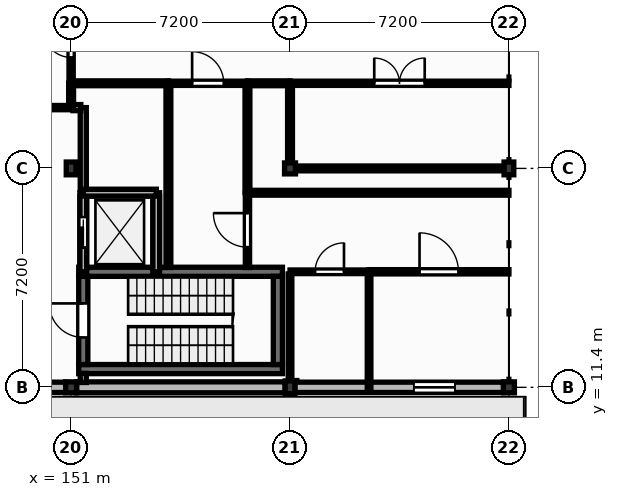
"""IFC4 building model, lengths in metres.
Left out: names, types, materials, properties, quantities, classifications, styles, units other than length and angle.
Written with IfcOpenShell. Run it as: python <this file> out.ifc"""

import sys

from ifc_helpers import new_model, si_unit, direction, frame, frame_2d, origin, origin_2d, place, context, subcontext, project, spatial, rectangle, extrude, element, fill, save


model = new_model("IFC4")
c1 = context("Model", 3, precision=1e-05, world=origin(), true_north=direction((0.0, 1.0)))
c2 = subcontext(c1, "Body", "Model", "MODEL_VIEW")
j1 = project(units=[si_unit("LENGTHUNIT", "METRE"), si_unit("PLANEANGLEUNIT", "RADIAN")], contexts=[c1])
p1 = place(None, origin())
s1 = spatial("IfcSite", under=j1, at=p1, CompositionType="ELEMENT")
p2 = place(p1, origin())
s2 = spatial("IfcBuilding", under=s1, at=p2, CompositionType="ELEMENT")
p3 = place(p2, frame((0.0, 0.0, 4.5)))
s3 = spatial("IfcBuildingStorey", under=s2, at=p3, CompositionType="ELEMENT", Elevation=4.5)
p4 = place(p3, frame((151.0, 11.4, 0.0), z_axis=(0.0, 0.0, 1.0), x_axis=(1.0, 0.0, 0.0)))
e1 = element("IfcColumn", 1, at=p4, inside=s3, PredefinedType="COLUMN", context=c2, shape_type="SweptSolid", body=[
    extrude(rectangle(XDim=0.36, YDim=0.36, at=origin_2d()), origin(), (0.0, 0.0, 1.0), 4.26),
])
for number, where, z_axis, x_axis in (
    (2, (151.0, 18.6, 0.0), (0.0, 0.0, 1.0), (1.0, 0.0, 0.0)),
    (3, (158.2, 11.4, 0.0), (0.0, 0.0, 1.0), (1.0, 0.0, 0.0)),
):
    element("IfcColumn", number, at=place(p3, frame(where, z_axis=z_axis, x_axis=x_axis)), inside=s3, PredefinedType="COLUMN", context=c2, shape_type="SweptSolid", body=[
        extrude(rectangle(XDim=0.32, YDim=0.42, at=origin_2d()), origin(), (0.0, 0.0, 1.0), 4.26),
    ])
for number, where, z_axis, x_axis in (
    (4, (158.2, 18.6, 0.0), (0.0, 0.0, 1.0), (1.0, 0.0, 0.0)),
    (5, (165.4, 11.4, 0.0), (0.0, 0.0, 1.0), (1.0, 0.0, 0.0)),
):
    element("IfcColumn", number, at=place(p3, frame(where, z_axis=z_axis, x_axis=x_axis)), inside=s3, PredefinedType="COLUMN", context=c2, shape_type="SweptSolid", body=[
        extrude(rectangle(XDim=0.36, YDim=0.36, at=origin_2d()), origin(), (0.0, 0.0, 1.0), 4.26),
    ])
p5 = place(p3, frame((165.4, 18.6, 0.0), z_axis=(0.0, 0.0, 1.0), x_axis=(1.0, 0.0, 0.0)))
e6 = element("IfcColumn", 6, at=p5, inside=s3, PredefinedType="COLUMN", context=c2, shape_type="SweptSolid", body=[
    extrude(rectangle(XDim=0.32, YDim=0.42, at=origin_2d()), origin(), (0.0, 0.0, 1.0), 4.26),
])
p6 = place(p3, frame((144.05, 11.4, 0.0), z_axis=(0.0, 0.0, 1.0), x_axis=(1.0, 0.0, 0.0)))
e7 = element("IfcWall", 7, at=p6, inside=s3, PredefinedType="SOLIDWALL", context=c2, shape_type="SweptSolid", body=[
    extrude(rectangle(XDim=6.77, YDim=0.34, at=frame_2d((3.385, 0.0))), origin(), (0.0, 0.0, 1.0), 3.76),
])
p7 = place(p6, frame((1.75, 0.0, 0.0)))
e8 = element("IfcOpeningElement", 8, at=p7, cuts=e7, PredefinedType="OPENING", context=c2, shape_type="SweptSolid", body=[
    extrude(rectangle(XDim=1.18, YDim=2.2, at=frame_2d((0.59, 1.1))), frame((0.0, 0.18, 0.0), z_axis=(0.0, -1.0, 0.0), x_axis=(1.0, 0.0, 0.0)), (0.0, 0.0, 1.0), 0.36),
])
p8 = place(p6, frame((4.4, 0.0, 1.05)))
e9 = element("IfcOpeningElement", 9, at=p8, cuts=e7, PredefinedType="OPENING", context=c2, shape_type="SweptSolid", body=[
    extrude(rectangle(XDim=1.4, YDim=1.65, at=frame_2d((0.7, 0.825))), frame((0.0, 0.18, 0.0), z_axis=(0.0, -1.0, 0.0), x_axis=(1.0, 0.0, 0.0)), (0.0, 0.0, 1.0), 0.36),
])
p9 = place(p3, frame((151.18, 11.4, 0.0), z_axis=(0.0, 0.0, 1.0), x_axis=(1.0, 0.0, 0.0)))
e10 = element("IfcWall", 10, at=p9, inside=s3, PredefinedType="SOLIDWALL", context=c2, shape_type="SweptSolid", body=[
    extrude(rectangle(XDim=6.86, YDim=0.36, at=frame_2d((3.43, 0.0))), origin(), (0.0, 0.0, 1.0), 3.8),
])
p10 = place(p3, frame((158.36, 11.4, 0.0), z_axis=(0.0, 0.0, 1.0), x_axis=(1.0, 0.0, 0.0)))
e11 = element("IfcWall", 11, at=p10, inside=s3, PredefinedType="SOLIDWALL", context=c2, shape_type="SweptSolid", body=[
    extrude(rectangle(XDim=6.86, YDim=0.34, at=frame_2d((3.43, 0.0))), origin(), (0.0, 0.0, 1.0), 3.8),
])
p11 = place(p10, frame((3.915, 0.0, 1.0)))
e12 = element("IfcOpeningElement", 12, at=p11, cuts=e11, PredefinedType="OPENING", context=c2, shape_type="SweptSolid", body=[
    extrude(rectangle(XDim=1.35, YDim=2.2, at=frame_2d((0.675, 1.1))), frame((0.0, 0.18, 0.0), z_axis=(0.0, -1.0, 0.0), x_axis=(1.0, 0.0, 0.0)), (0.0, 0.0, 1.0), 0.36),
])
for number, where, z_axis, x_axis in (
    (13, (151.25, 12.0, 0.0), (0.0, 0.0, 1.0), (1.0, 0.0, 0.0)),
    (14, (151.25, 15.2, 0.0), (0.0, 0.0, 1.0), (1.0, 0.0, 0.0)),
):
    element("IfcWall", number, at=place(p3, frame(where, z_axis=z_axis, x_axis=x_axis)), inside=s3, PredefinedType="SHEAR", context=c2, shape_type="SweptSolid", body=[
        extrude(rectangle(XDim=6.7, YDim=0.3, at=frame_2d((3.35, 0.0))), origin(), (0.0, 0.0, 1.0), 4.25),
    ])
p12 = place(p3, frame((151.4, 12.15, 0.0), z_axis=(0.0, 0.0, 1.0), x_axis=(0.0, 1.0, 0.0)))
e15 = element("IfcWall", 15, at=p12, inside=s3, PredefinedType="SHEAR", context=c2, shape_type="SweptSolid", body=[
    extrude(rectangle(XDim=2.9, YDim=0.3, at=frame_2d((1.45, 0.0))), origin(), (0.0, 0.0, 1.0), 4.25),
])
p13 = place(p12, frame((0.89, 0.0, 0.0)))
e16 = element("IfcOpeningElement", 16, at=p13, cuts=e15, PredefinedType="OPENING", context=c2, shape_type="SweptSolid", body=[
    extrude(rectangle(XDim=1.12, YDim=2.1, at=frame_2d((0.56, 1.05))), frame((0.0, 0.16, 0.0), z_axis=(0.0, -1.0, 0.0), x_axis=(1.0, 0.0, 0.0)), (0.0, 0.0, 1.0), 0.32),
])
p14 = place(p3, frame((157.8, 12.15, 0.0), z_axis=(0.0, 0.0, 1.0), x_axis=(0.0, 1.0, 0.0)))
e17 = element("IfcWall", 17, at=p14, inside=s3, PredefinedType="SHEAR", context=c2, shape_type="SweptSolid", body=[
    extrude(rectangle(XDim=2.9, YDim=0.3, at=frame_2d((1.45, 0.0))), origin(), (0.0, 0.0, 1.0), 4.25),
])
p15 = place(p3, frame((151.4, 17.8, 0.0), z_axis=(0.0, 0.0, 1.0), x_axis=(1.0, 0.0, 0.0)))
e18 = element("IfcWall", 18, at=p15, inside=s3, PredefinedType="SOLIDWALL", context=c2, shape_type="SweptSolid", body=[
    extrude(rectangle(XDim=2.4, YDim=0.22, at=frame_2d((1.2, 0.0))), origin(), (0.0, 0.0, 1.0), 4.25),
])
p16 = place(p3, frame((151.4, 15.31, 0.0), z_axis=(0.0, 0.0, 1.0), x_axis=(0.0, 1.0, 0.0)))
e19 = element("IfcWall", 19, at=p16, inside=s3, PredefinedType="SOLIDWALL", context=c2, shape_type="SweptSolid", body=[
    extrude(rectangle(XDim=2.38, YDim=0.22, at=frame_2d((1.19, 0.0))), origin(), (0.0, 0.0, 1.0), 4.25),
])
p17 = place(p16, frame((0.69, 0.0, 0.0)))
e20 = element("IfcOpeningElement", 20, at=p17, cuts=e19, PredefinedType="OPENING", context=c2, shape_type="SweptSolid", body=[
    extrude(rectangle(XDim=1.0, YDim=2.15, at=frame_2d((0.5, 1.075))), frame((0.0, 0.12, 0.0), z_axis=(0.0, -1.0, 0.0), x_axis=(1.0, 0.0, 0.0)), (0.0, 0.0, 1.0), 0.24),
])
p18 = place(p3, frame((153.8, 15.31, 0.0), z_axis=(0.0, 0.0, 1.0), x_axis=(0.0, 1.0, 0.0)))
e21 = element("IfcWall", 21, at=p18, inside=s3, PredefinedType="SOLIDWALL", context=c2, shape_type="SweptSolid", body=[
    extrude(rectangle(XDim=2.38, YDim=0.22, at=frame_2d((1.19, 0.0))), origin(), (0.0, 0.0, 1.0), 4.25),
])
for number, where, z_axis, x_axis in (
    (22, (151.4, 15.2, -0.9), (0.0, 0.0, 1.0), (0.0, 1.0, 0.0)),
    (23, (153.8, 15.2, -0.9), (0.0, 0.0, 1.0), (0.0, 1.0, 0.0)),
):
    element("IfcWall", number, at=place(p3, frame(where, z_axis=z_axis, x_axis=x_axis)), inside=s3, PredefinedType="SOLIDWALL", context=c2, shape_type="SweptSolid", body=[
        extrude(rectangle(XDim=2.6, YDim=0.22, at=frame_2d((1.3, 0.0))), origin(), (0.0, 0.0, 1.0), 0.9),
    ])
p19 = place(p3, frame((151.4, 17.8, -0.9), z_axis=(0.0, 0.0, 1.0), x_axis=(1.0, 0.0, 0.0)))
e24 = element("IfcWall", 24, at=p19, inside=s3, PredefinedType="SOLIDWALL", context=c2, shape_type="SweptSolid", body=[
    extrude(rectangle(XDim=2.4, YDim=0.22, at=frame_2d((1.2, 0.0))), origin(), (0.0, 0.0, 1.0), 0.9),
])
p20 = place(p3, frame((147.6, 20.6, 0.0), z_axis=(0.0, 0.0, 1.0), x_axis=(1.0, 0.0, 0.0)))
e25 = element("IfcWall", 25, at=p20, inside=s3, PredefinedType="PARTITIONING", context=c2, shape_type="SweptSolid", body=[
    extrude(rectangle(XDim=3.4, YDim=0.14, at=frame_2d((1.7, 0.0))), origin(), (0.0, 0.0, 1.0), 4.18),
])
p21 = place(p20, frame((0.8, 0.0, 0.0)))
e26 = element("IfcOpeningElement", 26, at=p21, cuts=e25, PredefinedType="OPENING", context=c2, shape_type="SweptSolid", body=[
    extrude(rectangle(XDim=1.8, YDim=2.3, at=frame_2d((0.9, 1.15))), frame((0.0, 0.08, 0.0), z_axis=(0.0, -1.0, 0.0), x_axis=(1.0, 0.0, 0.0)), (0.0, 0.0, 1.0), 0.16),
])
p22 = place(p3, frame((151.0, 21.4, 0.0), z_axis=(0.0, 0.0, 1.0), x_axis=(0.0, 1.0, 0.0)))
e27 = element("IfcWall", 27, at=p22, inside=s3, PredefinedType="PARTITIONING", context=c2, shape_type="SweptSolid", body=[
    extrude(rectangle(XDim=2.6, YDim=0.14, at=frame_2d((1.3, 0.0))), origin(), (0.0, 0.0, 1.0), 3.62),
])
p23 = place(p22, frame((0.85, 0.0, 0.0)))
e28 = element("IfcOpeningElement", 28, at=p23, cuts=e27, PredefinedType="OPENING", context=c2, shape_type="SweptSolid", body=[
    extrude(rectangle(XDim=0.9, YDim=2.1, at=frame_2d((0.45, 1.05))), frame((0.0, 0.08, 0.0), z_axis=(0.0, -1.0, 0.0), x_axis=(1.0, 0.0, 0.0)), (0.0, 0.0, 1.0), 0.16),
])
p24 = place(p3, frame((154.2, 21.4, 0.0), z_axis=(0.0, 0.0, 1.0), x_axis=(1.0, 0.0, 0.0)))
e29 = element("IfcWall", 29, at=p24, inside=s3, PredefinedType="PARTITIONING", context=c2, shape_type="SweptSolid", body=[
    extrude(rectangle(XDim=2.6, YDim=0.14, at=frame_2d((1.3, 0.0))), origin(), (0.0, 0.0, 1.0), 4.18),
])
p25 = place(p24, frame((0.78, 0.0, 0.0)))
e30 = element("IfcOpeningElement", 30, at=p25, cuts=e29, PredefinedType="OPENING", context=c2, shape_type="SweptSolid", body=[
    extrude(rectangle(XDim=1.04, YDim=2.1, at=frame_2d((0.52, 1.05))), frame((0.0, 0.08, 0.0), z_axis=(0.0, -1.0, 0.0), x_axis=(1.0, 0.0, 0.0)), (0.0, 0.0, 1.0), 0.16),
])
p26 = place(p3, frame((156.8, 15.34, 0.0), z_axis=(0.0, 0.0, 1.0), x_axis=(0.0, 1.0, 0.0)))
e31 = element("IfcWall", 31, at=p26, inside=s3, PredefinedType="PARTITIONING", context=c2, shape_type="SweptSolid", body=[
    extrude(rectangle(XDim=2.46, YDim=0.14, at=frame_2d((1.23, 0.0))), origin(), (0.0, 0.0, 1.0), 4.18),
])
p27 = place(p26, frame((0.67, 0.0, 0.0)))
e32 = element("IfcOpeningElement", 32, at=p27, cuts=e31, PredefinedType="OPENING", context=c2, shape_type="SweptSolid", body=[
    extrude(rectangle(XDim=1.12, YDim=2.15, at=frame_2d((0.56, 1.075))), frame((0.0, 0.08, 0.0), z_axis=(0.0, -1.0, 0.0), x_axis=(1.0, 0.0, 0.0)), (0.0, 0.0, 1.0), 0.16),
])
p28 = place(p3, frame((158.2, 15.2, 0.0), z_axis=(0.0, 0.0, 1.0), x_axis=(1.0, 0.0, 0.0)))
e33 = element("IfcWall", 33, at=p28, inside=s3, PredefinedType="PLUMBINGWALL", context=c2, shape_type="SweptSolid", body=[
    extrude(rectangle(XDim=2.6, YDim=0.12, at=frame_2d((1.3, 0.0))), origin(), (0.0, 0.0, 1.0), 4.18),
])
p29 = place(p28, frame((0.825, 0.0, 0.0)))
e34 = element("IfcOpeningElement", 34, at=p29, cuts=e33, PredefinedType="OPENING", context=c2, shape_type="SweptSolid", body=[
    extrude(rectangle(XDim=0.95, YDim=2.1, at=frame_2d((0.475, 1.05))), frame((0.0, 0.07, 0.0), z_axis=(0.0, -1.0, 0.0), x_axis=(1.0, 0.0, 0.0)), (0.0, 0.0, 1.0), 0.14),
])
p30 = place(p3, frame((158.2, 21.4, 0.0), z_axis=(0.0, 0.0, 1.0), x_axis=(1.0, 0.0, 0.0)))
e35 = element("IfcWall", 35, at=p30, inside=s3, PredefinedType="PARTITIONING", context=c2, shape_type="SweptSolid", body=[
    extrude(rectangle(XDim=7.2, YDim=0.14, at=frame_2d((3.6, 0.0))), origin(), (0.0, 0.0, 1.0), 4.18),
])
p31 = place(p30, frame((2.77, 0.0, 0.0)))
e36 = element("IfcOpeningElement", 36, at=p31, cuts=e35, PredefinedType="OPENING", context=c2, shape_type="SweptSolid", body=[
    extrude(rectangle(XDim=1.66, YDim=2.3, at=frame_2d((0.83, 1.15))), frame((0.0, 0.08, 0.0), z_axis=(0.0, -1.0, 0.0), x_axis=(1.0, 0.0, 0.0)), (0.0, 0.0, 1.0), 0.16),
])
p32 = place(p3, frame((160.8, 11.4, 0.0), z_axis=(0.0, 0.0, 1.0), x_axis=(0.0, 1.0, 0.0)))
e37 = element("IfcWall", 37, at=p32, inside=s3, PredefinedType="PLUMBINGWALL", context=c2, shape_type="SweptSolid", body=[
    extrude(rectangle(XDim=3.73, YDim=0.12, at=frame_2d((1.865, 0.0))), origin(), (0.0, 0.0, 1.0), 4.18),
])
p33 = place(p3, frame((160.8, 15.2, 0.0), z_axis=(0.0, 0.0, 1.0), x_axis=(1.0, 0.0, 0.0)))
e38 = element("IfcWall", 38, at=p33, inside=s3, PredefinedType="PARTITIONING", context=c2, shape_type="SweptSolid", body=[
    extrude(rectangle(XDim=4.6, YDim=0.14, at=frame_2d((2.3, 0.0))), origin(), (0.0, 0.0, 1.0), 4.18),
])
p34 = place(p33, frame((1.66, 0.0, 0.0)))
e39 = element("IfcOpeningElement", 39, at=p34, cuts=e38, PredefinedType="OPENING", context=c2, shape_type="SweptSolid", body=[
    extrude(rectangle(XDim=1.28, YDim=2.2, at=frame_2d((0.64, 1.1))), frame((0.0, 0.08, 0.0), z_axis=(0.0, -1.0, 0.0), x_axis=(1.0, 0.0, 0.0)), (0.0, 0.0, 1.0), 0.16),
])
p35 = place(p3, frame((151.4, 11.56, 0.0), z_axis=(0.0, 0.0, 1.0), x_axis=(0.0, 1.0, 0.0)))
e40 = element("IfcWall", 40, at=p35, inside=s3, PredefinedType="PARTITIONING", context=c2, shape_type="SweptSolid", body=[
    extrude(rectangle(XDim=0.3, YDim=0.2, at=frame_2d((0.15, 0.0))), origin(), (0.0, 0.0, 1.0), 4.18),
])
p36 = place(p3, frame((151.4, 17.91, 0.0), z_axis=(0.0, 0.0, 1.0), x_axis=(0.0, 1.0, 0.0)))
e41 = element("IfcWall", 41, at=p36, inside=s3, PredefinedType="PARTITIONING", context=c2, shape_type="SweptSolid", body=[
    extrude(rectangle(XDim=2.69, YDim=0.2, at=frame_2d((1.345, 0.0))), origin(), (0.0, 0.0, 1.0), 4.18),
])
p37 = place(p3, frame((151.32, 20.6, 0.0), z_axis=(0.0, 0.0, 1.0), x_axis=(-1.0, 0.0, 0.0)))
e42 = element("IfcWall", 42, at=p37, inside=s3, PredefinedType="PARTITIONING", context=c2, shape_type="SweptSolid", body=[
    extrude(rectangle(XDim=0.26, YDim=0.2, at=frame_2d((0.13, 0.0))), origin(), (0.0, 0.0, 1.0), 4.18),
])
p38 = place(p3, frame((151.0, 20.67, 0.0), z_axis=(0.0, 0.0, 1.0), x_axis=(0.0, 1.0, 0.0)))
e43 = element("IfcWall", 43, at=p38, inside=s3, PredefinedType="PARTITIONING", context=c2, shape_type="SweptSolid", body=[
    extrude(rectangle(XDim=0.73, YDim=0.16, at=frame_2d((0.365, 0.0))), origin(), (0.0, 0.0, 1.0), 3.62),
])
p39 = place(p3, frame((151.0, 21.4, 0.0), z_axis=(0.0, 0.0, 1.0), x_axis=(1.0, 0.0, 0.0)))
e44 = element("IfcWall", 44, at=p39, inside=s3, PredefinedType="PARTITIONING", context=c2, shape_type="SweptSolid", body=[
    extrude(rectangle(XDim=3.2, YDim=0.16, at=frame_2d((1.6, 0.0))), origin(), (0.0, 0.0, 1.0), 4.18),
])
p40 = place(p3, frame((156.8, 21.4, 0.0), z_axis=(0.0, 0.0, 1.0), x_axis=(1.0, 0.0, 0.0)))
e45 = element("IfcWall", 45, at=p40, inside=s3, PredefinedType="PARTITIONING", context=c2, shape_type="SweptSolid", body=[
    extrude(rectangle(XDim=1.4, YDim=0.16, at=frame_2d((0.7, 0.0))), origin(), (0.0, 0.0, 1.0), 4.18),
])
p41 = place(p3, frame((156.8, 17.8, 0.0), z_axis=(0.0, 0.0, 1.0), x_axis=(0.0, 1.0, 0.0)))
e46 = element("IfcWall", 46, at=p41, inside=s3, PredefinedType="PARTITIONING", context=c2, shape_type="SweptSolid", body=[
    extrude(rectangle(XDim=3.53, YDim=0.16, at=frame_2d((1.765, 0.0))), origin(), (0.0, 0.0, 1.0), 4.18),
])
p42 = place(p3, frame((154.2, 15.34, 0.0), z_axis=(0.0, 0.0, 1.0), x_axis=(0.0, 1.0, 0.0)))
e47 = element("IfcWall", 47, at=p42, inside=s3, PredefinedType="PARTITIONING", context=c2, shape_type="SweptSolid", body=[
    extrude(rectangle(XDim=5.99, YDim=0.16, at=frame_2d((2.995, 0.0))), origin(), (0.0, 0.0, 1.0), 4.18),
])
p43 = place(p3, frame((165.4, 17.8, 0.0), z_axis=(0.0, 0.0, 1.0), x_axis=(-1.0, 0.0, 0.0)))
e48 = element("IfcWall", 48, at=p43, inside=s3, PredefinedType="PARTITIONING", context=c2, shape_type="SweptSolid", body=[
    extrude(rectangle(XDim=8.6, YDim=0.16, at=frame_2d((4.3, 0.0))), origin(), (0.0, 0.0, 1.0), 4.18),
])
p44 = place(p3, frame((158.2, 11.61, 0.0), z_axis=(0.0, 0.0, 1.0), x_axis=(0.0, 1.0, 0.0)))
e49 = element("IfcWall", 49, at=p44, inside=s3, PredefinedType="PLUMBINGWALL", context=c2, shape_type="SweptSolid", body=[
    extrude(rectangle(XDim=3.52, YDim=0.12, at=frame_2d((1.76, 0.0))), origin(), (0.0, 0.0, 1.0), 3.74),
])
p45 = place(p3, frame((158.38, 18.6, 0.0), z_axis=(0.0, 0.0, 1.0), x_axis=(1.0, 0.0, 0.0)))
e50 = element("IfcWall", 50, at=p45, inside=s3, PredefinedType="PARTITIONING", context=c2, shape_type="SweptSolid", body=[
    extrude(rectangle(XDim=6.86, YDim=0.16, at=frame_2d((3.43, 0.0))), origin(), (0.0, 0.0, 1.0), 3.62),
])
p46 = place(p3, frame((158.2, 18.78, 0.0), z_axis=(0.0, 0.0, 1.0), x_axis=(0.0, 1.0, 0.0)))
e51 = element("IfcWall", 51, at=p46, inside=s3, PredefinedType="PARTITIONING", context=c2, shape_type="SweptSolid", body=[
    extrude(rectangle(XDim=2.55, YDim=0.16, at=frame_2d((1.275, 0.0))), origin(), (0.0, 0.0, 1.0), 3.62),
])
p47 = place(p11, origin())
e52 = element("IfcWindow", 52, at=p47, inside=s3, PartitioningType="SINGLE_PANEL", PredefinedType="WINDOW", context=c2, shape_type="SweptSolid", body=[
    extrude(rectangle(XDim=1.35, YDim=2.2, at=frame_2d((0.675, 1.1))), frame((0.0, 0.03, 0.0), z_axis=(0.0, -1.0, 0.0), x_axis=(1.0, 0.0, 0.0)), (0.0, 0.0, 1.0), 0.06),
])
fill(e12, e52)
p48 = place(p17, origin())
e53 = element("IfcDoor", 53, at=p48, inside=s3, OperationType="SLIDING_TO_LEFT", PredefinedType="DOOR", context=c2, shape_type="SweptSolid", body=[
    extrude(rectangle(XDim=1.0, YDim=2.15, at=frame_2d((0.5, 1.075))), frame((0.0, 0.025, 0.0), z_axis=(0.0, -1.0, 0.0), x_axis=(1.0, 0.0, 0.0)), (0.0, 0.0, 1.0), 0.05),
])
fill(e20, e53)
p49 = place(p13, origin())
e54 = element("IfcDoor", 54, at=p49, inside=s3, OperationType="SINGLE_SWING_RIGHT", PredefinedType="DOOR", context=c2, shape_type="SweptSolid", body=[
    extrude(rectangle(XDim=1.12, YDim=2.1, at=frame_2d((0.56, 1.05))), frame((0.0, 0.025, 0.0), z_axis=(0.0, -1.0, 0.0), x_axis=(1.0, 0.0, 0.0)), (0.0, 0.0, 1.0), 0.05),
])
fill(e16, e54)
p50 = place(p23, origin())
e55 = element("IfcDoor", 55, at=p50, inside=s3, OperationType="SINGLE_SWING_RIGHT", PredefinedType="DOOR", context=c2, shape_type="SweptSolid", body=[
    extrude(rectangle(XDim=0.9, YDim=2.1, at=frame_2d((0.45, 1.05))), frame((0.0, 0.025, 0.0), z_axis=(0.0, -1.0, 0.0), x_axis=(1.0, 0.0, 0.0)), (0.0, 0.0, 1.0), 0.05),
])
fill(e28, e55)
p51 = place(p25, origin())
e56 = element("IfcDoor", 56, at=p51, inside=s3, OperationType="SINGLE_SWING_LEFT", PredefinedType="DOOR", context=c2, shape_type="SweptSolid", body=[
    extrude(rectangle(XDim=1.04, YDim=2.1, at=frame_2d((0.52, 1.05))), frame((0.0, 0.025, 0.0), z_axis=(0.0, -1.0, 0.0), x_axis=(1.0, 0.0, 0.0)), (0.0, 0.0, 1.0), 0.05),
])
fill(e30, e56)
p52 = place(p27, origin())
e57 = element("IfcDoor", 57, at=p52, inside=s3, OperationType="SINGLE_SWING_RIGHT", PredefinedType="DOOR", context=c2, shape_type="SweptSolid", body=[
    extrude(rectangle(XDim=1.12, YDim=2.15, at=frame_2d((0.56, 1.075))), frame((0.0, 0.025, 0.0), z_axis=(0.0, -1.0, 0.0), x_axis=(1.0, 0.0, 0.0)), (0.0, 0.0, 1.0), 0.05),
])
fill(e32, e57)
p53 = place(p29, origin())
e58 = element("IfcDoor", 58, at=p53, inside=s3, OperationType="SINGLE_SWING_RIGHT", PredefinedType="DOOR", context=c2, shape_type="SweptSolid", body=[
    extrude(rectangle(XDim=0.95, YDim=2.1, at=frame_2d((0.475, 1.05))), frame((0.0, 0.025, 0.0), z_axis=(0.0, -1.0, 0.0), x_axis=(1.0, 0.0, 0.0)), (0.0, 0.0, 1.0), 0.05),
])
fill(e34, e58)
p54 = place(p34, origin())
e59 = element("IfcDoor", 59, at=p54, inside=s3, OperationType="SINGLE_SWING_LEFT", PredefinedType="DOOR", context=c2, shape_type="SweptSolid", body=[
    extrude(rectangle(XDim=1.28, YDim=2.2, at=frame_2d((0.64, 1.1))), frame((0.0, 0.025, 0.0), z_axis=(0.0, -1.0, 0.0), x_axis=(1.0, 0.0, 0.0)), (0.0, 0.0, 1.0), 0.05),
])
fill(e39, e59)
p55 = place(p31, origin())
e60 = element("IfcDoor", 60, at=p55, inside=s3, OperationType="DOUBLE_DOOR_SINGLE_SWING", PredefinedType="DOOR", context=c2, shape_type="SweptSolid", body=[
    extrude(rectangle(XDim=1.66, YDim=2.3, at=frame_2d((0.83, 1.15))), frame((0.0, 0.025, 0.0), z_axis=(0.0, -1.0, 0.0), x_axis=(1.0, 0.0, 0.0)), (0.0, 0.0, 1.0), 0.05),
])
fill(e36, e60)
save(model, sys.argv[1])
